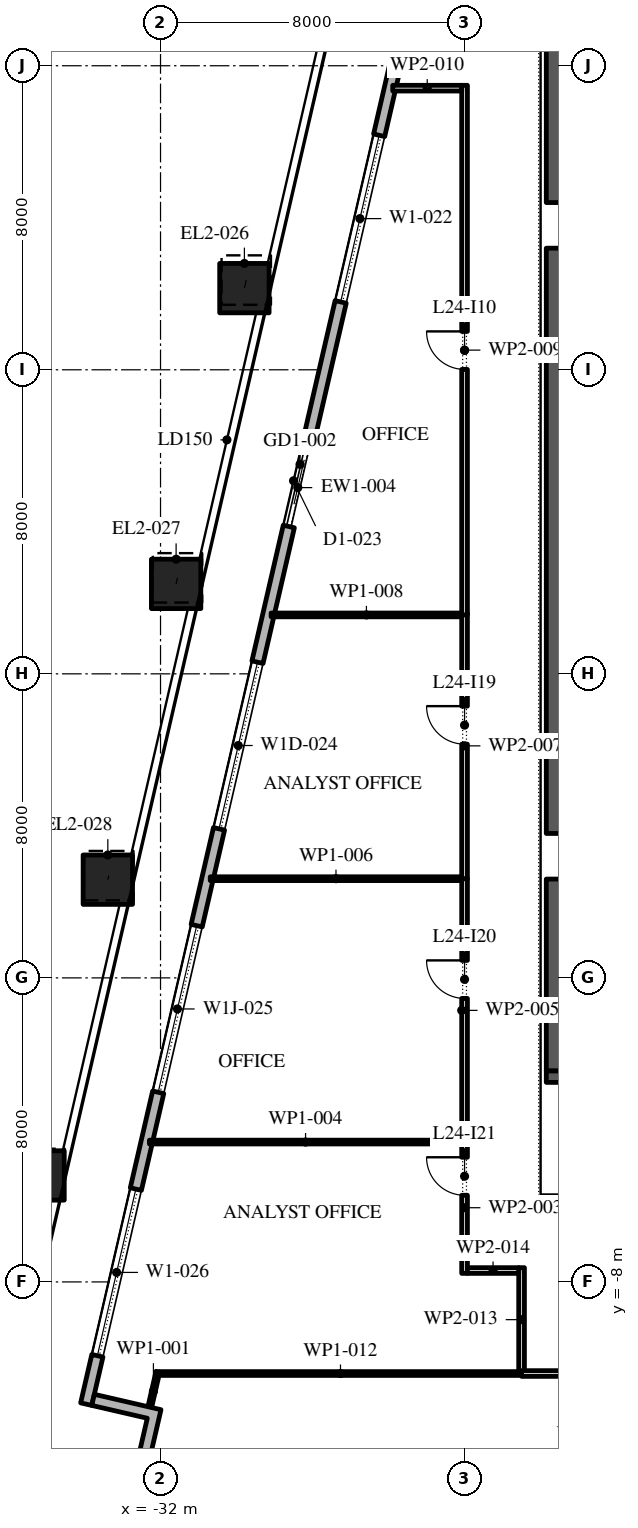
"""IFC4 building model, lengths in metres.
Left out: names, types, materials, properties, quantities, classifications, styles, units other than length and angle.
Written with IfcOpenShell. Run it as: python <this file> out.ifc"""

import sys

from ifc_helpers import new_model, si_unit, direction, frame, frame_2d, origin, origin_2d, place, context, subcontext, project, spatial, polyline, rectangle, outline, extrude, element, fill, save


model = new_model("IFC4")
c1 = context("Model", 3, precision=1e-05, world=origin(), true_north=direction((0.0, 1.0)))
c2 = subcontext(c1, "Body", "Model", "MODEL_VIEW")
j1 = project(units=[si_unit("LENGTHUNIT", "METRE"), si_unit("PLANEANGLEUNIT", "RADIAN")], contexts=[c1])
p1 = place(None, origin())
s1 = spatial("IfcSite", under=j1, at=p1, CompositionType="ELEMENT")
p2 = place(p1, origin())
s2 = spatial("IfcBuilding", under=s1, at=p2, CompositionType="ELEMENT")
p3 = place(p2, frame((0.0, 0.0, 114.0)))
s3 = spatial("IfcBuildingStorey", under=s2, at=p3, CompositionType="ELEMENT", Elevation=114.0)
p4 = place(p3, frame((-29.793, 18.149, 0.0), z_axis=(0.011668301382, 0.050504588071, 0.998655665045), x_axis=(-0.974334539389, 0.225104876342, 0.0)))
e1 = element("IfcColumn", 1, at=p4, inside=s3, PredefinedType="COLUMN", context=c2, shape_type="SweptSolid", body=[
    extrude(rectangle(XDim=1.3, YDim=1.3, at=origin_2d()), origin(), (0.0, 0.0, 1.0), 4.206),
])
p5 = place(p3, frame((-31.59, 10.366, 0.0), z_axis=(0.008770865357, 0.037987721479, 0.999239713451), x_axis=(-0.97436607968, 0.224968315033, 0.0)))
e2 = element("IfcColumn", 2, at=p5, inside=s3, PredefinedType="COLUMN", context=c2, shape_type="SweptSolid", body=[
    extrude(rectangle(XDim=1.3, YDim=1.3, at=origin_2d()), origin(), (0.0, 0.0, 1.0), 4.203),
])
p6 = place(p3, frame((-33.387, 2.584, 0.0), z_axis=(0.005869091843, 0.025277771797, 0.999663237302), x_axis=(-0.974088391429, 0.226167649504, 0.0)))
e3 = element("IfcColumn", 3, at=p6, inside=s3, PredefinedType="COLUMN", context=c2, shape_type="SweptSolid", body=[
    extrude(rectangle(XDim=1.3, YDim=1.3, at=origin_2d()), origin(), (0.0, 0.0, 1.0), 4.201),
])
p7 = place(p3, frame((-35.183, -5.198, 0.0), z_axis=(0.002964348167, 0.012671135303, 0.9999153239), x_axis=(-0.973709261374, 0.227794368487, 0.0)))
e4 = element("IfcColumn", 4, at=p7, inside=s3, PredefinedType="COLUMN", context=c2, shape_type="SweptSolid", body=[
    extrude(rectangle(XDim=1.3, YDim=1.3, at=origin_2d()), origin(), (0.0, 0.0, 1.0), 4.2),
])
p8 = place(p3, frame((-22.82, 37.016, 0.0), z_axis=(0.0, 0.0, 1.0), x_axis=(-0.224953880882, -0.974369412223, 0.0)))
e5 = element("IfcWall", 5, at=p8, inside=s3, PredefinedType="STANDARD", context=c2, shape_type="SweptSolid", body=[
    extrude(rectangle(XDim=49.5, YDim=0.3, at=frame_2d((24.75, 0.0))), origin(), (0.0, 0.0, 1.0), 4.0),
])
p9 = place(p8, frame((1.157, 0.0, 0.45)))
e6 = element("IfcOpeningElement", 6, at=p9, cuts=e5, PredefinedType="OPENING", context=c2, shape_type="SweptSolid", body=[
    extrude(rectangle(XDim=4.5, YDim=3.05, at=frame_2d((2.25, 1.525))), frame((0.0, 0.16, 0.0), z_axis=(0.0, -1.0, 0.0), x_axis=(1.0, 0.0, 0.0)), (0.0, 0.0, 1.0), 0.32),
])
p10 = place(p8, frame((8.121, 0.0, 0.45)))
e7 = element("IfcOpeningElement", 7, at=p10, cuts=e5, PredefinedType="OPENING", context=c2, shape_type="SweptSolid", body=[
    extrude(rectangle(XDim=4.5, YDim=3.05, at=frame_2d((2.25, 1.525))), frame((0.0, 0.16, 0.0), z_axis=(0.0, -1.0, 0.0), x_axis=(1.0, 0.0, 0.0)), (0.0, 0.0, 1.0), 0.32),
])
p11 = place(p8, frame((15.236, 0.0, 0.45)))
e8 = element("IfcOpeningElement", 8, at=p11, cuts=e5, PredefinedType="OPENING", context=c2, shape_type="SweptSolid", body=[
    extrude(rectangle(XDim=4.5, YDim=3.05, at=frame_2d((2.25, 1.525))), frame((0.0, 0.16, 0.0), z_axis=(0.0, -1.0, 0.0), x_axis=(1.0, 0.0, 0.0)), (0.0, 0.0, 1.0), 0.32),
])
p12 = place(p8, frame((23.4, 0.0, 0.0)))
e9 = element("IfcOpeningElement", 9, at=p12, cuts=e5, PredefinedType="OPENING", context=c2, shape_type="SweptSolid", body=[
    extrude(rectangle(XDim=2.4, YDim=3.5, at=frame_2d((1.2, 1.75))), frame((0.0, 0.16, 0.0), z_axis=(0.0, -1.0, 0.0), x_axis=(1.0, 0.0, 0.0)), (0.0, 0.0, 1.0), 0.32),
])
p13 = place(p8, frame((29.464, 0.0, 0.45)))
e10 = element("IfcOpeningElement", 10, at=p13, cuts=e5, PredefinedType="OPENING", context=c2, shape_type="SweptSolid", body=[
    extrude(rectangle(XDim=4.5, YDim=2.875, at=frame_2d((2.25, 1.438))), frame((0.0, 0.16, 0.0), z_axis=(0.0, -1.0, 0.0), x_axis=(1.0, 0.0, 0.0)), (0.0, 0.0, 1.0), 0.32),
])
p14 = place(p8, frame((36.579, 0.0, 0.45)))
e11 = element("IfcOpeningElement", 11, at=p14, cuts=e5, PredefinedType="OPENING", context=c2, shape_type="SweptSolid", body=[
    extrude(rectangle(XDim=4.5, YDim=2.675, at=frame_2d((2.25, 1.337))), frame((0.0, 0.16, 0.0), z_axis=(0.0, -1.0, 0.0), x_axis=(1.0, 0.0, 0.0)), (0.0, 0.0, 1.0), 0.32),
])
p15 = place(p8, frame((43.693, 0.0, 0.45)))
e12 = element("IfcOpeningElement", 12, at=p15, cuts=e5, PredefinedType="OPENING", context=c2, shape_type="SweptSolid", body=[
    extrude(rectangle(XDim=4.5, YDim=3.05, at=frame_2d((2.25, 1.525))), frame((0.0, 0.16, 0.0), z_axis=(0.0, -1.0, 0.0), x_axis=(1.0, 0.0, 0.0)), (0.0, 0.0, 1.0), 0.32),
])
p16 = place(p3, origin())
e13 = element("IfcWall", 13, at=p16, inside=s3, PredefinedType="STANDARD", context=c2, shape_type="SweptSolid", body=[
    extrude(outline(polyline([(-32.393, -13.116), (-30.639, -13.521), (-31.111, -15.567), (-31.404, -15.5), (-30.999, -13.746), (-32.753, -13.341), (-32.348, -11.587), (-33.809, -11.25), (-33.742, -10.957), (-31.988, -11.362), (-32.393, -13.116)])), origin(), (0.0, 0.0, 1.0), 4.0),
])
p17 = place(p3, frame((-21.425, -2.45, 0.0), z_axis=(0.0, 0.0, 1.0), x_axis=(0.0, 1.0, 0.0)))
e14 = element("IfcWall", 14, at=p17, inside=s3, PredefinedType="SHEAR", context=c2, shape_type="SweptSolid", body=[
    extrude(rectangle(XDim=27.9, YDim=0.85, at=frame_2d((13.95, 0.0))), origin(), (0.0, 0.0, 1.0), 4.0),
])
p18 = place(p17, frame((5.05, 0.0, 0.0)))
e15 = element("IfcOpeningElement", 15, at=p18, cuts=e14, PredefinedType="OPENING", context=c2, shape_type="SweptSolid", body=[
    extrude(rectangle(XDim=1.2, YDim=2.1, at=frame_2d((0.6, 1.05))), frame((0.0, 0.435, 0.0), z_axis=(0.0, -1.0, 0.0), x_axis=(1.0, 0.0, 0.0)), (0.0, 0.0, 1.0), 0.87),
])
p19 = place(p17, frame((21.65, 0.0, 0.0)))
e16 = element("IfcOpeningElement", 16, at=p19, cuts=e14, PredefinedType="OPENING", context=c2, shape_type="SweptSolid", body=[
    extrude(rectangle(XDim=1.2, YDim=2.1, at=frame_2d((0.6, 1.05))), frame((0.0, 0.435, 0.0), z_axis=(0.0, -1.0, 0.0), x_axis=(1.0, 0.0, 0.0)), (0.0, 0.0, 1.0), 0.87),
])
p20 = place(p3, frame((-21.85, -2.6, 0.0), z_axis=(0.0, 0.0, 1.0), x_axis=(1.0, 0.0, 0.0)))
e17 = element("IfcWall", 17, at=p20, inside=s3, PredefinedType="SHEAR", context=c2, shape_type="SweptSolid", body=[
    extrude(rectangle(XDim=11.7, YDim=0.3, at=frame_2d((5.85, 0.0))), origin(), (0.0, 0.0, 1.0), 4.0),
])
p21 = place(p3, frame((-32.069, -10.361, 0.0), z_axis=(0.0, 0.0, 1.0), x_axis=(-0.222987762652, -0.974821243976, 0.0)))
e18 = element("IfcWall", 18, at=p21, inside=s3, PredefinedType="PARTITIONING", context=c2, shape_type="SweptSolid", body=[
    extrude(rectangle(XDim=1.058, YDim=0.1, at=frame_2d((0.529, 0.0))), origin(), (0.0, 0.0, 1.0), 4.0),
])
p22 = place(p3, frame((-24.0, -7.775, 0.0), z_axis=(0.0, 0.0, 1.0), x_axis=(0.0, 1.0, 0.0)))
e19 = element("IfcWall", 19, at=p22, inside=s3, PredefinedType="PARTITIONING", context=c2, shape_type="SweptSolid", body=[
    extrude(rectangle(XDim=3.455, YDim=0.15, at=frame_2d((1.728, 0.0))), origin(), (0.0, 0.0, 1.0), 4.0),
])
p23 = place(p22, frame((2.055, 0.0, 0.0)))
e20 = element("IfcOpeningElement", 20, at=p23, cuts=e19, PredefinedType="OPENING", context=c2, shape_type="SweptSolid", body=[
    extrude(rectangle(XDim=1.0, YDim=2.1, at=frame_2d((0.5, 1.05))), frame((0.0, 0.085, 0.0), z_axis=(0.0, -1.0, 0.0), x_axis=(1.0, 0.0, 0.0)), (0.0, 0.0, 1.0), 0.17),
])
p24 = place(p3, frame((-24.075, -4.32, 0.0), z_axis=(0.0, 0.0, 1.0), x_axis=(-1.0, 0.0, 0.0)))
e21 = element("IfcWall", 21, at=p24, inside=s3, PredefinedType="PARTITIONING", context=c2, shape_type="SweptSolid", body=[
    extrude(rectangle(XDim=8.217, YDim=0.1, at=frame_2d((4.108, 0.0))), origin(), (0.0, 0.0, 1.0), 4.0),
])
p25 = place(p3, frame((-24.0, -4.32, 0.0), z_axis=(0.0, 0.0, 1.0), x_axis=(0.0, 1.0, 0.0)))
e22 = element("IfcWall", 22, at=p25, inside=s3, PredefinedType="PARTITIONING", context=c2, shape_type="SweptSolid", body=[
    extrude(rectangle(XDim=6.93, YDim=0.15, at=frame_2d((3.465, 0.0))), origin(), (0.0, 0.0, 1.0), 4.0),
])
p26 = place(p25, frame((3.78, 0.0, 0.0)))
e23 = element("IfcOpeningElement", 23, at=p26, cuts=e22, PredefinedType="OPENING", context=c2, shape_type="SweptSolid", body=[
    extrude(rectangle(XDim=1.0, YDim=2.1, at=frame_2d((0.5, 1.05))), frame((0.0, 0.085, 0.0), z_axis=(0.0, -1.0, 0.0), x_axis=(1.0, 0.0, 0.0)), (0.0, 0.0, 1.0), 0.17),
])
p27 = place(p3, frame((-24.075, 2.61, 0.0), z_axis=(0.0, 0.0, 1.0), x_axis=(-1.0, 0.0, 0.0)))
e24 = element("IfcWall", 24, at=p27, inside=s3, PredefinedType="PARTITIONING", context=c2, shape_type="SweptSolid", body=[
    extrude(rectangle(XDim=6.617, YDim=0.1, at=frame_2d((3.309, 0.0))), origin(), (0.0, 0.0, 1.0), 4.0),
])
p28 = place(p3, frame((-24.0, 2.61, 0.0), z_axis=(0.0, 0.0, 1.0), x_axis=(0.0, 1.0, 0.0)))
e25 = element("IfcWall", 25, at=p28, inside=s3, PredefinedType="PARTITIONING", context=c2, shape_type="SweptSolid", body=[
    extrude(rectangle(XDim=6.99, YDim=0.15, at=frame_2d((3.495, 0.0))), origin(), (0.0, 0.0, 1.0), 4.0),
])
p29 = place(p28, frame((3.54, 0.0, 0.0)))
e26 = element("IfcOpeningElement", 26, at=p29, cuts=e25, PredefinedType="OPENING", context=c2, shape_type="SweptSolid", body=[
    extrude(rectangle(XDim=1.0, YDim=2.1, at=frame_2d((0.5, 1.05))), frame((0.0, 0.085, 0.0), z_axis=(0.0, -1.0, 0.0), x_axis=(1.0, 0.0, 0.0)), (0.0, 0.0, 1.0), 0.17),
])
p30 = place(p3, frame((-24.075, 9.55, 0.0), z_axis=(0.0, 0.0, 1.0), x_axis=(-1.0, 0.0, 0.0)))
e27 = element("IfcWall", 27, at=p30, inside=s3, PredefinedType="PARTITIONING", context=c2, shape_type="SweptSolid", body=[
    extrude(rectangle(XDim=5.015, YDim=0.1, at=frame_2d((2.508, 0.0))), origin(), (0.0, 0.0, 1.0), 4.0),
])
p31 = place(p3, frame((-24.0, 9.55, 0.0), z_axis=(0.0, 0.0, 1.0), x_axis=(0.0, 1.0, 0.0)))
e28 = element("IfcWall", 28, at=p31, inside=s3, PredefinedType="PARTITIONING", context=c2, shape_type="SweptSolid", body=[
    extrude(rectangle(XDim=13.935, YDim=0.15, at=frame_2d((6.968, 0.0))), origin(), (0.0, 0.0, 1.0), 4.0),
])
p32 = place(p31, frame((6.46, 0.0, 0.0)))
e29 = element("IfcOpeningElement", 29, at=p32, cuts=e28, PredefinedType="OPENING", context=c2, shape_type="SweptSolid", body=[
    extrude(rectangle(XDim=1.0, YDim=2.1, at=frame_2d((0.5, 1.05))), frame((0.0, 0.085, 0.0), z_axis=(0.0, -1.0, 0.0), x_axis=(1.0, 0.0, 0.0)), (0.0, 0.0, 1.0), 0.17),
])
p33 = place(p3, frame((-24.075, 23.41, 0.0), z_axis=(0.0, 0.0, 1.0), x_axis=(-1.0, 0.0, 0.0)))
e30 = element("IfcWall", 30, at=p33, inside=s3, PredefinedType="PARTITIONING", context=c2, shape_type="SweptSolid", body=[
    extrude(rectangle(XDim=1.815, YDim=0.15, at=frame_2d((0.907, 0.0))), origin(), (0.0, 0.0, 1.0), 4.0),
])
p34 = place(p3, frame((-22.5, -10.41, 0.0), z_axis=(0.0, 0.0, 1.0), x_axis=(-1.0, 0.0, 0.0)))
e31 = element("IfcWall", 31, at=p34, inside=s3, PredefinedType="PARTITIONING", context=c2, shape_type="SweptSolid", body=[
    extrude(rectangle(XDim=9.53, YDim=0.1, at=frame_2d((4.765, 0.0))), origin(), (0.0, 0.0, 1.0), 4.0),
])
p35 = place(p3, frame((-22.5, -10.36, 0.0), z_axis=(0.0, 0.0, 1.0), x_axis=(0.0, 1.0, 0.0)))
e32 = element("IfcWall", 32, at=p35, inside=s3, PredefinedType="PARTITIONING", context=c2, shape_type="SweptSolid", body=[
    extrude(rectangle(XDim=2.735, YDim=0.15, at=frame_2d((1.368, 0.0))), origin(), (0.0, 0.0, 1.0), 4.0),
])
p36 = place(p3, frame((-22.575, -7.7, 0.0), z_axis=(0.0, 0.0, 1.0), x_axis=(-1.0, 0.0, 0.0)))
e33 = element("IfcWall", 33, at=p36, inside=s3, PredefinedType="PARTITIONING", context=c2, shape_type="SweptSolid", body=[
    extrude(rectangle(XDim=1.35, YDim=0.15, at=frame_2d((0.675, 0.0))), origin(), (0.0, 0.0, 1.0), 4.0),
])
p37 = place(p3, frame((-18.7, -10.41, 0.0), z_axis=(0.0, 0.0, 1.0), x_axis=(-1.0, 0.0, 0.0)))
e34 = element("IfcWall", 34, at=p37, inside=s3, PredefinedType="PARTITIONING", context=c2, shape_type="SweptSolid", body=[
    extrude(rectangle(XDim=3.8, YDim=0.15, at=frame_2d((1.9, 0.0))), origin(), (0.0, 0.0, 1.0), 4.0),
])
p38 = place(p37, frame((1.4, 0.0, 0.0)))
e35 = element("IfcOpeningElement", 35, at=p38, cuts=e34, PredefinedType="OPENING", context=c2, shape_type="SweptSolid", body=[
    extrude(rectangle(XDim=1.0, YDim=2.1, at=frame_2d((0.5, 1.05))), frame((0.0, 0.085, 0.0), z_axis=(0.0, -1.0, 0.0), x_axis=(1.0, 0.0, 0.0)), (0.0, 0.0, 1.0), 0.17),
])
p39 = place(p11, origin())
e36 = element("IfcWindow", 36, at=p39, inside=s3, PartitioningType="DOUBLE_PANEL_VERTICAL", PredefinedType="WINDOW", context=c2, shape_type="SweptSolid", body=[
    extrude(rectangle(XDim=4.5, YDim=3.05, at=frame_2d((2.25, 1.525))), frame((0.0, 0.03, 0.0), z_axis=(0.0, -1.0, 0.0), x_axis=(1.0, 0.0, 0.0)), (0.0, 0.0, 1.0), 0.06),
])
fill(e8, e36)
p40 = place(p12, origin())
e37 = element("IfcDoor", 37, at=p40, inside=s3, OperationType="DOUBLE_DOOR_SLIDING", PredefinedType="DOOR", context=c2, shape_type="SweptSolid", body=[
    extrude(rectangle(XDim=2.4, YDim=3.5, at=frame_2d((1.2, 1.75))), frame((0.0, 0.025, 0.0), z_axis=(0.0, -1.0, 0.0), x_axis=(1.0, 0.0, 0.0)), (0.0, 0.0, 1.0), 0.05),
])
fill(e9, e37)
p41 = place(p13, origin())
e38 = element("IfcWindow", 38, at=p41, inside=s3, PartitioningType="DOUBLE_PANEL_VERTICAL", PredefinedType="WINDOW", context=c2, shape_type="SweptSolid", body=[
    extrude(rectangle(XDim=4.5, YDim=2.875, at=frame_2d((2.25, 1.438))), frame((0.0, 0.03, 0.0), z_axis=(0.0, -1.0, 0.0), x_axis=(1.0, 0.0, 0.0)), (0.0, 0.0, 1.0), 0.06),
])
fill(e10, e38)
p42 = place(p14, origin())
e39 = element("IfcWindow", 39, at=p42, inside=s3, PartitioningType="DOUBLE_PANEL_VERTICAL", PredefinedType="WINDOW", context=c2, shape_type="SweptSolid", body=[
    extrude(rectangle(XDim=4.5, YDim=2.675, at=frame_2d((2.25, 1.337))), frame((0.0, 0.03, 0.0), z_axis=(0.0, -1.0, 0.0), x_axis=(1.0, 0.0, 0.0)), (0.0, 0.0, 1.0), 0.06),
])
fill(e11, e39)
p43 = place(p15, origin())
e40 = element("IfcWindow", 40, at=p43, inside=s3, PartitioningType="DOUBLE_PANEL_VERTICAL", PredefinedType="WINDOW", context=c2, shape_type="SweptSolid", body=[
    extrude(rectangle(XDim=4.5, YDim=3.05, at=frame_2d((2.25, 1.525))), frame((0.0, 0.03, 0.0), z_axis=(0.0, -1.0, 0.0), x_axis=(1.0, 0.0, 0.0)), (0.0, 0.0, 1.0), 0.06),
])
fill(e12, e40)
p44 = place(p32, origin())
e41 = element("IfcDoor", 41, at=p44, inside=s3, OperationType="SINGLE_SWING_LEFT", PredefinedType="DOOR", context=c2, shape_type="SweptSolid", body=[
    extrude(rectangle(XDim=1.0, YDim=2.1, at=frame_2d((0.5, 1.05))), frame((0.0, 0.025, 0.0), z_axis=(0.0, -1.0, 0.0), x_axis=(1.0, 0.0, 0.0)), (0.0, 0.0, 1.0), 0.05),
])
fill(e29, e41)
p45 = place(p29, origin())
e42 = element("IfcDoor", 42, at=p45, inside=s3, OperationType="SINGLE_SWING_LEFT", PredefinedType="DOOR", context=c2, shape_type="SweptSolid", body=[
    extrude(rectangle(XDim=1.0, YDim=2.1, at=frame_2d((0.5, 1.05))), frame((0.0, 0.025, 0.0), z_axis=(0.0, -1.0, 0.0), x_axis=(1.0, 0.0, 0.0)), (0.0, 0.0, 1.0), 0.05),
])
fill(e26, e42)
p46 = place(p26, origin())
e43 = element("IfcDoor", 43, at=p46, inside=s3, OperationType="SINGLE_SWING_LEFT", PredefinedType="DOOR", context=c2, shape_type="SweptSolid", body=[
    extrude(rectangle(XDim=1.0, YDim=2.1, at=frame_2d((0.5, 1.05))), frame((0.0, 0.025, 0.0), z_axis=(0.0, -1.0, 0.0), x_axis=(1.0, 0.0, 0.0)), (0.0, 0.0, 1.0), 0.05),
])
fill(e23, e43)
p47 = place(p23, origin())
e44 = element("IfcDoor", 44, at=p47, inside=s3, OperationType="SINGLE_SWING_LEFT", PredefinedType="DOOR", context=c2, shape_type="SweptSolid", body=[
    extrude(rectangle(XDim=1.0, YDim=2.1, at=frame_2d((0.5, 1.05))), frame((0.0, 0.025, 0.0), z_axis=(0.0, -1.0, 0.0), x_axis=(1.0, 0.0, 0.0)), (0.0, 0.0, 1.0), 0.05),
])
fill(e20, e44)
save(model, sys.argv[1])
